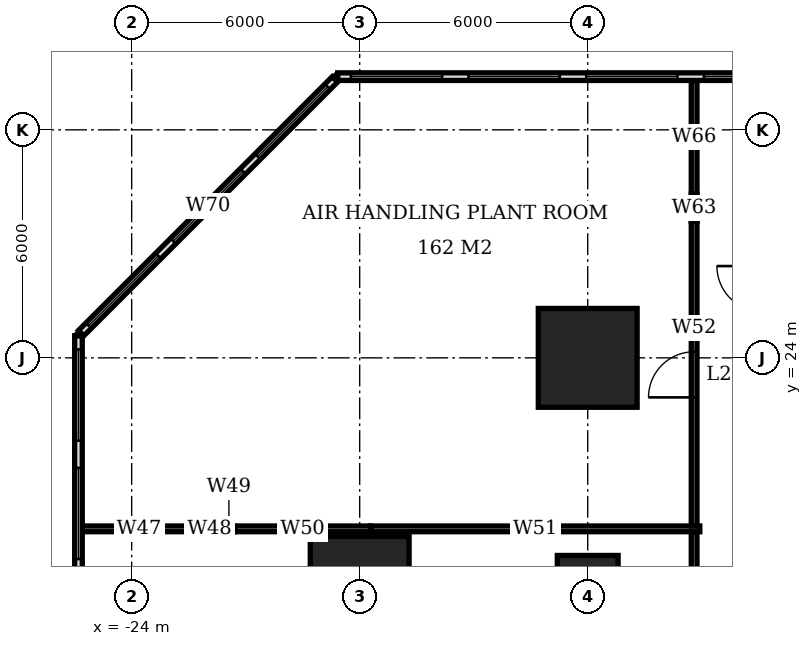
"""IFC4 building model, lengths in metres.
Left out: names, types, materials, properties, quantities, classifications, styles, units other than length and angle.
Written with IfcOpenShell. Run it as: python <this file> out.ifc"""

import sys

from ifc_helpers import new_model, si_unit, direction, frame, frame_2d, origin, origin_2d, place, context, subcontext, project, spatial, rectangle, extrude, element, fill, save


model = new_model("IFC4")
c1 = context("Model", 3, precision=1e-05, world=origin(), true_north=direction((0.0, 1.0)))
c2 = subcontext(c1, "Body", "Model", "MODEL_VIEW")
j1 = project(units=[si_unit("LENGTHUNIT", "METRE"), si_unit("PLANEANGLEUNIT", "RADIAN")], contexts=[c1])
p1 = place(None, origin())
s1 = spatial("IfcSite", under=j1, at=p1, CompositionType="ELEMENT")
p2 = place(p1, origin())
s2 = spatial("IfcBuilding", under=s1, at=p2, CompositionType="ELEMENT")
p3 = place(p2, frame((0.0, 0.0, 88.4)))
s3 = spatial("IfcBuildingStorey", under=s2, at=p3, CompositionType="ELEMENT", Elevation=88.4)
p4 = place(p3, frame((-18.0, 18.0, 0.0), z_axis=(0.0, 0.0, 1.0), x_axis=(1.0, 0.0, 0.0)))
e1 = element("IfcColumn", 1, at=p4, inside=s3, PredefinedType="COLUMN", context=c2, shape_type="SweptSolid", body=[
    extrude(rectangle(XDim=2.6, YDim=2.6, at=origin_2d()), origin(), (0.0, 0.0, 1.0), 5.4),
])
p5 = place(p3, frame((-12.0, 18.0, 0.0), z_axis=(0.0, 0.0, 1.0), x_axis=(1.0, 0.0, 0.0)))
e2 = element("IfcColumn", 2, at=p5, inside=s3, PredefinedType="COLUMN", context=c2, shape_type="SweptSolid", body=[
    extrude(rectangle(XDim=1.6, YDim=1.6, at=origin_2d()), origin(), (0.0, 0.0, 1.0), 5.4),
])
p6 = place(p3, frame((-12.0, 24.0, 0.0), z_axis=(0.0, 0.0, 1.0), x_axis=(1.0, 0.0, 0.0)))
e3 = element("IfcColumn", 3, at=p6, inside=s3, PredefinedType="COLUMN", context=c2, shape_type="SweptSolid", body=[
    extrude(rectangle(XDim=2.6, YDim=2.6, at=origin_2d()), origin(), (0.0, 0.0, 1.0), 5.4),
])
p7 = place(p3, frame((18.58, 31.4, 0.0), z_axis=(0.0, 0.0, 1.0), x_axis=(-1.0, 0.0, 0.0)))
e4 = element("IfcWall", 4, at=p7, inside=s3, PredefinedType="USERDEFINED", context=c2, shape_type="SweptSolid", body=[
    extrude(rectangle(XDim=37.16, YDim=0.2, at=frame_2d((18.58, 0.0))), origin(), (0.0, 0.0, 1.0), 5.4),
])
p8 = place(p7, frame((0.348, 0.0, 0.6)))
e5 = element("IfcOpeningElement", 5, at=p8, cuts=e4, PredefinedType="OPENING", context=c2, shape_type="SweptSolid", body=[
    extrude(rectangle(XDim=2.4, YDim=3.0, at=frame_2d((1.2, 1.5))), frame((0.0, 0.11, 0.0), z_axis=(0.0, -1.0, 0.0), x_axis=(1.0, 0.0, 0.0)), (0.0, 0.0, 1.0), 0.22),
])
p9 = place(p7, frame((3.445, 0.0, 0.6)))
e6 = element("IfcOpeningElement", 6, at=p9, cuts=e4, PredefinedType="OPENING", context=c2, shape_type="SweptSolid", body=[
    extrude(rectangle(XDim=2.4, YDim=3.0, at=frame_2d((1.2, 1.5))), frame((0.0, 0.11, 0.0), z_axis=(0.0, -1.0, 0.0), x_axis=(1.0, 0.0, 0.0)), (0.0, 0.0, 1.0), 0.22),
])
p10 = place(p7, frame((6.542, 0.0, 0.6)))
e7 = element("IfcOpeningElement", 7, at=p10, cuts=e4, PredefinedType="OPENING", context=c2, shape_type="SweptSolid", body=[
    extrude(rectangle(XDim=2.4, YDim=3.0, at=frame_2d((1.2, 1.5))), frame((0.0, 0.11, 0.0), z_axis=(0.0, -1.0, 0.0), x_axis=(1.0, 0.0, 0.0)), (0.0, 0.0, 1.0), 0.22),
])
p11 = place(p7, frame((9.638, 0.0, 0.6)))
e8 = element("IfcOpeningElement", 8, at=p11, cuts=e4, PredefinedType="OPENING", context=c2, shape_type="SweptSolid", body=[
    extrude(rectangle(XDim=2.4, YDim=3.0, at=frame_2d((1.2, 1.5))), frame((0.0, 0.11, 0.0), z_axis=(0.0, -1.0, 0.0), x_axis=(1.0, 0.0, 0.0)), (0.0, 0.0, 1.0), 0.22),
])
p12 = place(p7, frame((12.735, 0.0, 0.6)))
e9 = element("IfcOpeningElement", 9, at=p12, cuts=e4, PredefinedType="OPENING", context=c2, shape_type="SweptSolid", body=[
    extrude(rectangle(XDim=2.4, YDim=3.0, at=frame_2d((1.2, 1.5))), frame((0.0, 0.11, 0.0), z_axis=(0.0, -1.0, 0.0), x_axis=(1.0, 0.0, 0.0)), (0.0, 0.0, 1.0), 0.22),
])
p13 = place(p7, frame((15.832, 0.0, 0.6)))
e10 = element("IfcOpeningElement", 10, at=p13, cuts=e4, PredefinedType="OPENING", context=c2, shape_type="SweptSolid", body=[
    extrude(rectangle(XDim=2.4, YDim=3.0, at=frame_2d((1.2, 1.5))), frame((0.0, 0.11, 0.0), z_axis=(0.0, -1.0, 0.0), x_axis=(1.0, 0.0, 0.0)), (0.0, 0.0, 1.0), 0.22),
])
p14 = place(p7, frame((18.928, 0.0, 0.6)))
e11 = element("IfcOpeningElement", 11, at=p14, cuts=e4, PredefinedType="OPENING", context=c2, shape_type="SweptSolid", body=[
    extrude(rectangle(XDim=2.4, YDim=3.0, at=frame_2d((1.2, 1.5))), frame((0.0, 0.11, 0.0), z_axis=(0.0, -1.0, 0.0), x_axis=(1.0, 0.0, 0.0)), (0.0, 0.0, 1.0), 0.22),
])
p15 = place(p7, frame((22.025, 0.0, 0.6)))
e12 = element("IfcOpeningElement", 12, at=p15, cuts=e4, PredefinedType="OPENING", context=c2, shape_type="SweptSolid", body=[
    extrude(rectangle(XDim=2.4, YDim=3.0, at=frame_2d((1.2, 1.5))), frame((0.0, 0.11, 0.0), z_axis=(0.0, -1.0, 0.0), x_axis=(1.0, 0.0, 0.0)), (0.0, 0.0, 1.0), 0.22),
])
p16 = place(p7, frame((25.122, 0.0, 0.6)))
e13 = element("IfcOpeningElement", 13, at=p16, cuts=e4, PredefinedType="OPENING", context=c2, shape_type="SweptSolid", body=[
    extrude(rectangle(XDim=2.4, YDim=3.0, at=frame_2d((1.2, 1.5))), frame((0.0, 0.11, 0.0), z_axis=(0.0, -1.0, 0.0), x_axis=(1.0, 0.0, 0.0)), (0.0, 0.0, 1.0), 0.22),
])
p17 = place(p7, frame((28.218, 0.0, 0.6)))
e14 = element("IfcOpeningElement", 14, at=p17, cuts=e4, PredefinedType="OPENING", context=c2, shape_type="SweptSolid", body=[
    extrude(rectangle(XDim=2.4, YDim=3.0, at=frame_2d((1.2, 1.5))), frame((0.0, 0.11, 0.0), z_axis=(0.0, -1.0, 0.0), x_axis=(1.0, 0.0, 0.0)), (0.0, 0.0, 1.0), 0.22),
])
p18 = place(p7, frame((31.315, 0.0, 0.6)))
e15 = element("IfcOpeningElement", 15, at=p18, cuts=e4, PredefinedType="OPENING", context=c2, shape_type="SweptSolid", body=[
    extrude(rectangle(XDim=2.4, YDim=3.0, at=frame_2d((1.2, 1.5))), frame((0.0, 0.11, 0.0), z_axis=(0.0, -1.0, 0.0), x_axis=(1.0, 0.0, 0.0)), (0.0, 0.0, 1.0), 0.22),
])
p19 = place(p7, frame((34.412, 0.0, 0.6)))
e16 = element("IfcOpeningElement", 16, at=p19, cuts=e4, PredefinedType="OPENING", context=c2, shape_type="SweptSolid", body=[
    extrude(rectangle(XDim=2.4, YDim=3.0, at=frame_2d((1.2, 1.5))), frame((0.0, 0.11, 0.0), z_axis=(0.0, -1.0, 0.0), x_axis=(1.0, 0.0, 0.0)), (0.0, 0.0, 1.0), 0.22),
])
p20 = place(p3, frame((-18.651, 31.329, 0.0), z_axis=(0.0, 0.0, 1.0), x_axis=(-0.707106781187, -0.707106781187, 0.0)))
e17 = element("IfcWall", 17, at=p20, inside=s3, PredefinedType="USERDEFINED", context=c2, shape_type="SweptSolid", body=[
    extrude(rectangle(XDim=9.445, YDim=0.2, at=frame_2d((4.723, 0.0))), origin(), (0.0, 0.0, 1.0), 5.4),
])
p21 = place(p20, frame((0.274, 0.0, 0.6)))
e18 = element("IfcOpeningElement", 18, at=p21, cuts=e17, PredefinedType="OPENING", context=c2, shape_type="SweptSolid", body=[
    extrude(rectangle(XDim=2.6, YDim=3.0, at=frame_2d((1.3, 1.5))), frame((0.0, 0.11, 0.0), z_axis=(0.0, -1.0, 0.0), x_axis=(1.0, 0.0, 0.0)), (0.0, 0.0, 1.0), 0.22),
])
p22 = place(p20, frame((3.423, 0.0, 0.6)))
e19 = element("IfcOpeningElement", 19, at=p22, cuts=e17, PredefinedType="OPENING", context=c2, shape_type="SweptSolid", body=[
    extrude(rectangle(XDim=2.6, YDim=3.0, at=frame_2d((1.3, 1.5))), frame((0.0, 0.11, 0.0), z_axis=(0.0, -1.0, 0.0), x_axis=(1.0, 0.0, 0.0)), (0.0, 0.0, 1.0), 0.22),
])
p23 = place(p20, frame((6.571, 0.0, 0.6)))
e20 = element("IfcOpeningElement", 20, at=p23, cuts=e17, PredefinedType="OPENING", context=c2, shape_type="SweptSolid", body=[
    extrude(rectangle(XDim=2.6, YDim=3.0, at=frame_2d((1.3, 1.5))), frame((0.0, 0.11, 0.0), z_axis=(0.0, -1.0, 0.0), x_axis=(1.0, 0.0, 0.0)), (0.0, 0.0, 1.0), 0.22),
])
p24 = place(p3, frame((-25.4, 24.58, 0.0), z_axis=(0.0, 0.0, 1.0), x_axis=(0.0, -1.0, 0.0)))
e21 = element("IfcWall", 21, at=p24, inside=s3, PredefinedType="USERDEFINED", context=c2, shape_type="SweptSolid", body=[
    extrude(rectangle(XDim=31.16, YDim=0.2, at=frame_2d((15.58, 0.0))), origin(), (0.0, 0.0, 1.0), 5.4),
])
p25 = place(p24, frame((0.358, 0.0, 0.6)))
e22 = element("IfcOpeningElement", 22, at=p25, cuts=e21, PredefinedType="OPENING", context=c2, shape_type="SweptSolid", body=[
    extrude(rectangle(XDim=2.4, YDim=3.0, at=frame_2d((1.2, 1.5))), frame((0.0, 0.11, 0.0), z_axis=(0.0, -1.0, 0.0), x_axis=(1.0, 0.0, 0.0)), (0.0, 0.0, 1.0), 0.22),
])
p26 = place(p24, frame((3.474, 0.0, 0.6)))
e23 = element("IfcOpeningElement", 23, at=p26, cuts=e21, PredefinedType="OPENING", context=c2, shape_type="SweptSolid", body=[
    extrude(rectangle(XDim=2.4, YDim=3.0, at=frame_2d((1.2, 1.5))), frame((0.0, 0.11, 0.0), z_axis=(0.0, -1.0, 0.0), x_axis=(1.0, 0.0, 0.0)), (0.0, 0.0, 1.0), 0.22),
])
p27 = place(p24, frame((6.59, 0.0, 0.6)))
e24 = element("IfcOpeningElement", 24, at=p27, cuts=e21, PredefinedType="OPENING", context=c2, shape_type="SweptSolid", body=[
    extrude(rectangle(XDim=2.4, YDim=3.0, at=frame_2d((1.2, 1.5))), frame((0.0, 0.11, 0.0), z_axis=(0.0, -1.0, 0.0), x_axis=(1.0, 0.0, 0.0)), (0.0, 0.0, 1.0), 0.22),
])
p28 = place(p24, frame((9.706, 0.0, 0.6)))
e25 = element("IfcOpeningElement", 25, at=p28, cuts=e21, PredefinedType="OPENING", context=c2, shape_type="SweptSolid", body=[
    extrude(rectangle(XDim=2.4, YDim=3.0, at=frame_2d((1.2, 1.5))), frame((0.0, 0.11, 0.0), z_axis=(0.0, -1.0, 0.0), x_axis=(1.0, 0.0, 0.0)), (0.0, 0.0, 1.0), 0.22),
])
p29 = place(p24, frame((12.822, 0.0, 0.6)))
e26 = element("IfcOpeningElement", 26, at=p29, cuts=e21, PredefinedType="OPENING", context=c2, shape_type="SweptSolid", body=[
    extrude(rectangle(XDim=2.4, YDim=3.0, at=frame_2d((1.2, 1.5))), frame((0.0, 0.11, 0.0), z_axis=(0.0, -1.0, 0.0), x_axis=(1.0, 0.0, 0.0)), (0.0, 0.0, 1.0), 0.22),
])
p30 = place(p24, frame((15.938, 0.0, 0.6)))
e27 = element("IfcOpeningElement", 27, at=p30, cuts=e21, PredefinedType="OPENING", context=c2, shape_type="SweptSolid", body=[
    extrude(rectangle(XDim=2.4, YDim=3.0, at=frame_2d((1.2, 1.5))), frame((0.0, 0.11, 0.0), z_axis=(0.0, -1.0, 0.0), x_axis=(1.0, 0.0, 0.0)), (0.0, 0.0, 1.0), 0.22),
])
p31 = place(p24, frame((19.054, 0.0, 0.6)))
e28 = element("IfcOpeningElement", 28, at=p31, cuts=e21, PredefinedType="OPENING", context=c2, shape_type="SweptSolid", body=[
    extrude(rectangle(XDim=2.4, YDim=3.0, at=frame_2d((1.2, 1.5))), frame((0.0, 0.11, 0.0), z_axis=(0.0, -1.0, 0.0), x_axis=(1.0, 0.0, 0.0)), (0.0, 0.0, 1.0), 0.22),
])
p32 = place(p24, frame((22.17, 0.0, 0.6)))
e29 = element("IfcOpeningElement", 29, at=p32, cuts=e21, PredefinedType="OPENING", context=c2, shape_type="SweptSolid", body=[
    extrude(rectangle(XDim=2.4, YDim=3.0, at=frame_2d((1.2, 1.5))), frame((0.0, 0.11, 0.0), z_axis=(0.0, -1.0, 0.0), x_axis=(1.0, 0.0, 0.0)), (0.0, 0.0, 1.0), 0.22),
])
p33 = place(p24, frame((25.286, 0.0, 0.6)))
e30 = element("IfcOpeningElement", 30, at=p33, cuts=e21, PredefinedType="OPENING", context=c2, shape_type="SweptSolid", body=[
    extrude(rectangle(XDim=2.4, YDim=3.0, at=frame_2d((1.2, 1.5))), frame((0.0, 0.11, 0.0), z_axis=(0.0, -1.0, 0.0), x_axis=(1.0, 0.0, 0.0)), (0.0, 0.0, 1.0), 0.22),
])
p34 = place(p24, frame((28.402, 0.0, 0.6)))
e31 = element("IfcOpeningElement", 31, at=p34, cuts=e21, PredefinedType="OPENING", context=c2, shape_type="SweptSolid", body=[
    extrude(rectangle(XDim=2.4, YDim=3.0, at=frame_2d((1.2, 1.5))), frame((0.0, 0.11, 0.0), z_axis=(0.0, -1.0, 0.0), x_axis=(1.0, 0.0, 0.0)), (0.0, 0.0, 1.0), 0.22),
])
p35 = place(p3, frame((-25.3, 19.5, 0.0), z_axis=(0.0, 0.0, 1.0), x_axis=(1.0, 0.0, 0.0)))
e32 = element("IfcWall", 32, at=p35, inside=s3, PredefinedType="PARTITIONING", context=c2, shape_type="SweptSolid", body=[
    extrude(rectangle(XDim=2.99, YDim=0.15, at=frame_2d((1.495, 0.0))), origin(), (0.0, 0.0, 1.0), 5.15),
])
p36 = place(p3, frame((-22.31, 19.5, 0.0), z_axis=(0.0, 0.0, 1.0), x_axis=(1.0, 0.0, 0.0)))
e33 = element("IfcWall", 33, at=p36, inside=s3, PredefinedType="PARTITIONING", context=c2, shape_type="SweptSolid", body=[
    extrude(rectangle(XDim=0.72, YDim=0.15, at=frame_2d((0.36, 0.0))), origin(), (0.0, 0.0, 1.0), 4.15),
])
p37 = place(p3, frame((-21.59, 19.5, 0.0), z_axis=(0.0, 0.0, 1.0), x_axis=(1.0, 0.0, 0.0)))
e34 = element("IfcWall", 34, at=p37, inside=s3, PredefinedType="PARTITIONING", context=c2, shape_type="SweptSolid", body=[
    extrude(rectangle(XDim=0.298, YDim=0.15, at=frame_2d((0.149, 0.0))), origin(), (0.0, 0.0, 1.0), 5.15),
])
p38 = place(p3, frame((-21.292, 19.5, 0.0), z_axis=(0.0, 0.0, 1.0), x_axis=(1.0, 0.0, 0.0)))
e35 = element("IfcWall", 35, at=p38, inside=s3, PredefinedType="PARTITIONING", context=c2, shape_type="SweptSolid", body=[
    extrude(rectangle(XDim=3.584, YDim=0.15, at=frame_2d((1.792, 0.0))), origin(), (0.0, 0.0, 1.0), 4.15),
])
p39 = place(p3, frame((-17.708, 19.5, 0.0), z_axis=(0.0, 0.0, 1.0), x_axis=(1.0, 0.0, 0.0)))
e36 = element("IfcWall", 36, at=p39, inside=s3, PredefinedType="PARTITIONING", context=c2, shape_type="SweptSolid", body=[
    extrude(rectangle(XDim=8.658, YDim=0.15, at=frame_2d((4.329, 0.0))), origin(), (0.0, 0.0, 1.0), 5.15),
])
p40 = place(p3, frame((-9.2, 7.575, 0.0), z_axis=(0.0, 0.0, 1.0), x_axis=(0.0, 1.0, 0.0)))
e37 = element("IfcWall", 37, at=p40, inside=s3, PredefinedType="PARTITIONING", context=c2, shape_type="SweptSolid", body=[
    extrude(rectangle(XDim=11.85, YDim=0.15, at=frame_2d((5.925, 0.0))), origin(), (0.0, 0.0, 1.0), 5.15),
])
p41 = place(p40, frame((3.525, 0.0, 0.0)))
e38 = element("IfcOpeningElement", 38, at=p41, cuts=e37, PredefinedType="OPENING", context=c2, shape_type="SweptSolid", body=[
    extrude(rectangle(XDim=1.2, YDim=2.4, at=frame_2d((0.6, 1.2))), frame((0.0, 0.085, 0.0), z_axis=(0.0, -1.0, 0.0), x_axis=(1.0, 0.0, 0.0)), (0.0, 0.0, 1.0), 0.17),
])
p42 = place(p3, frame((-9.2, 19.575, 0.0), z_axis=(0.0, 0.0, 1.0), x_axis=(0.0, 1.0, 0.0)))
e39 = element("IfcWall", 39, at=p42, inside=s3, PredefinedType="PARTITIONING", context=c2, shape_type="SweptSolid", body=[
    extrude(rectangle(XDim=8.015, YDim=0.15, at=frame_2d((4.008, 0.0))), origin(), (0.0, 0.0, 1.0), 5.15),
])
p43 = place(p42, frame((3.385, 0.0, 0.0)))
e40 = element("IfcOpeningElement", 40, at=p43, cuts=e39, PredefinedType="OPENING", context=c2, shape_type="SweptSolid", body=[
    extrude(rectangle(XDim=1.2, YDim=2.4, at=frame_2d((0.6, 1.2))), frame((0.0, 0.085, 0.0), z_axis=(0.0, -1.0, 0.0), x_axis=(1.0, 0.0, 0.0)), (0.0, 0.0, 1.0), 0.17),
])
p44 = place(p3, frame((-9.2, 27.59, 0.0), z_axis=(0.0, 0.0, 1.0), x_axis=(0.0, 1.0, 0.0)))
e41 = element("IfcWall", 41, at=p44, inside=s3, PredefinedType="PARTITIONING", context=c2, shape_type="SweptSolid", body=[
    extrude(rectangle(XDim=0.72, YDim=0.15, at=frame_2d((0.36, 0.0))), origin(), (0.0, 0.0, 1.0), 4.15),
])
p45 = place(p3, frame((-9.2, 28.31, 0.0), z_axis=(0.0, 0.0, 1.0), x_axis=(0.0, 1.0, 0.0)))
e42 = element("IfcWall", 42, at=p45, inside=s3, PredefinedType="PARTITIONING", context=c2, shape_type="SweptSolid", body=[
    extrude(rectangle(XDim=2.99, YDim=0.15, at=frame_2d((1.495, 0.0))), origin(), (0.0, 0.0, 1.0), 5.15),
])
p46 = place(p16, origin())
e43 = element("IfcWindow", 43, at=p46, inside=s3, PartitioningType="SINGLE_PANEL", PredefinedType="USERDEFINED", context=c2, shape_type="SweptSolid", body=[
    extrude(rectangle(XDim=2.4, YDim=3.0, at=frame_2d((1.2, 1.5))), frame((0.0, 0.03, 0.0), z_axis=(0.0, -1.0, 0.0), x_axis=(1.0, 0.0, 0.0)), (0.0, 0.0, 1.0), 0.06),
])
fill(e13, e43)
p47 = place(p17, origin())
e44 = element("IfcWindow", 44, at=p47, inside=s3, PartitioningType="SINGLE_PANEL", PredefinedType="USERDEFINED", context=c2, shape_type="SweptSolid", body=[
    extrude(rectangle(XDim=2.4, YDim=3.0, at=frame_2d((1.2, 1.5))), frame((0.0, 0.03, 0.0), z_axis=(0.0, -1.0, 0.0), x_axis=(1.0, 0.0, 0.0)), (0.0, 0.0, 1.0), 0.06),
])
fill(e14, e44)
p48 = place(p18, origin())
e45 = element("IfcWindow", 45, at=p48, inside=s3, PartitioningType="SINGLE_PANEL", PredefinedType="USERDEFINED", context=c2, shape_type="SweptSolid", body=[
    extrude(rectangle(XDim=2.4, YDim=3.0, at=frame_2d((1.2, 1.5))), frame((0.0, 0.03, 0.0), z_axis=(0.0, -1.0, 0.0), x_axis=(1.0, 0.0, 0.0)), (0.0, 0.0, 1.0), 0.06),
])
fill(e15, e45)
p49 = place(p19, origin())
e46 = element("IfcWindow", 46, at=p49, inside=s3, PartitioningType="SINGLE_PANEL", PredefinedType="USERDEFINED", context=c2, shape_type="SweptSolid", body=[
    extrude(rectangle(XDim=2.4, YDim=3.0, at=frame_2d((1.2, 1.5))), frame((0.0, 0.03, 0.0), z_axis=(0.0, -1.0, 0.0), x_axis=(1.0, 0.0, 0.0)), (0.0, 0.0, 1.0), 0.06),
])
fill(e16, e46)
p50 = place(p21, origin())
e47 = element("IfcWindow", 47, at=p50, inside=s3, PartitioningType="SINGLE_PANEL", PredefinedType="USERDEFINED", context=c2, shape_type="SweptSolid", body=[
    extrude(rectangle(XDim=2.6, YDim=3.0, at=frame_2d((1.3, 1.5))), frame((0.0, 0.03, 0.0), z_axis=(0.0, -1.0, 0.0), x_axis=(1.0, 0.0, 0.0)), (0.0, 0.0, 1.0), 0.06),
])
fill(e18, e47)
p51 = place(p22, origin())
e48 = element("IfcWindow", 48, at=p51, inside=s3, PartitioningType="SINGLE_PANEL", PredefinedType="USERDEFINED", context=c2, shape_type="SweptSolid", body=[
    extrude(rectangle(XDim=2.6, YDim=3.0, at=frame_2d((1.3, 1.5))), frame((0.0, 0.03, 0.0), z_axis=(0.0, -1.0, 0.0), x_axis=(1.0, 0.0, 0.0)), (0.0, 0.0, 1.0), 0.06),
])
fill(e19, e48)
p52 = place(p23, origin())
e49 = element("IfcWindow", 49, at=p52, inside=s3, PartitioningType="SINGLE_PANEL", PredefinedType="USERDEFINED", context=c2, shape_type="SweptSolid", body=[
    extrude(rectangle(XDim=2.6, YDim=3.0, at=frame_2d((1.3, 1.5))), frame((0.0, 0.03, 0.0), z_axis=(0.0, -1.0, 0.0), x_axis=(1.0, 0.0, 0.0)), (0.0, 0.0, 1.0), 0.06),
])
fill(e20, e49)
p53 = place(p25, origin())
e50 = element("IfcWindow", 50, at=p53, inside=s3, PartitioningType="SINGLE_PANEL", PredefinedType="USERDEFINED", context=c2, shape_type="SweptSolid", body=[
    extrude(rectangle(XDim=2.4, YDim=3.0, at=frame_2d((1.2, 1.5))), frame((0.0, 0.03, 0.0), z_axis=(0.0, -1.0, 0.0), x_axis=(1.0, 0.0, 0.0)), (0.0, 0.0, 1.0), 0.06),
])
fill(e22, e50)
p54 = place(p26, origin())
e51 = element("IfcWindow", 51, at=p54, inside=s3, PartitioningType="SINGLE_PANEL", PredefinedType="USERDEFINED", context=c2, shape_type="SweptSolid", body=[
    extrude(rectangle(XDim=2.4, YDim=3.0, at=frame_2d((1.2, 1.5))), frame((0.0, 0.03, 0.0), z_axis=(0.0, -1.0, 0.0), x_axis=(1.0, 0.0, 0.0)), (0.0, 0.0, 1.0), 0.06),
])
fill(e23, e51)
p55 = place(p43, origin())
e52 = element("IfcDoor", 52, at=p55, inside=s3, OperationType="SINGLE_SWING_LEFT", PredefinedType="DOOR", context=c2, shape_type="SweptSolid", body=[
    extrude(rectangle(XDim=1.2, YDim=2.4, at=frame_2d((0.6, 1.2))), frame((0.0, 0.025, 0.0), z_axis=(0.0, -1.0, 0.0), x_axis=(1.0, 0.0, 0.0)), (0.0, 0.0, 1.0), 0.05),
])
fill(e40, e52)
save(model, sys.argv[1])
